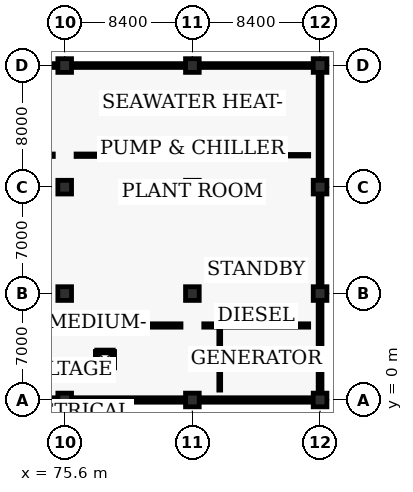
"""IFC4 building model, lengths in metres.
Left out: names, types, materials, properties, quantities, classifications, styles, units other than length and angle.
Written with IfcOpenShell. Run it as: python <this file> out.ifc"""

import sys

from ifc_helpers import new_model, si_unit, direction, frame, frame_2d, origin, origin_2d, place, context, subcontext, project, spatial, rectangle, extrude, element, fill, save


model = new_model("IFC4")
c1 = context("Model", 3, precision=1e-05, world=origin(), true_north=direction((0.0, 1.0)))
c2 = subcontext(c1, "Body", "Model", "MODEL_VIEW")
j1 = project(units=[si_unit("LENGTHUNIT", "METRE"), si_unit("PLANEANGLEUNIT", "RADIAN")], contexts=[c1])
p1 = place(None, origin())
s1 = spatial("IfcSite", under=j1, at=p1, CompositionType="ELEMENT")
p2 = place(p1, origin())
s2 = spatial("IfcBuilding", under=s1, at=p2, CompositionType="ELEMENT")
p3 = place(p2, origin())
s3 = spatial("IfcBuildingStorey", under=s2, at=p3, CompositionType="ELEMENT", Elevation=0.0)
for number, where, z_axis, x_axis in (
    (1, (75.6, 0.0, -0.46), (0.0, 0.0, 1.0), (1.0, 0.0, 0.0)),
    (2, (75.6, 7.0, -0.46), (0.0, 0.0, 1.0), (1.0, 0.0, 0.0)),
    (3, (75.6, 14.0, -0.46), (0.0, 0.0, 1.0), (1.0, 0.0, 0.0)),
    (4, (75.6, 22.0, -0.46), (0.0, 0.0, 1.0), (1.0, 0.0, 0.0)),
    (5, (84.0, 0.0, -0.46), (0.0, 0.0, 1.0), (1.0, 0.0, 0.0)),
    (6, (84.0, 7.0, -0.46), (0.0, 0.0, 1.0), (1.0, 0.0, 0.0)),
    (7, (84.0, 14.0, -0.46), (0.0, 0.0, 1.0), (1.0, 0.0, 0.0)),
    (8, (84.0, 22.0, -0.46), (0.0, 0.0, 1.0), (1.0, 0.0, 0.0)),
    (9, (92.4, 0.0, -0.46), (0.0, 0.0, 1.0), (1.0, 0.0, 0.0)),
    (10, (92.4, 7.0, -0.46), (0.0, 0.0, 1.0), (1.0, 0.0, 0.0)),
    (11, (92.4, 14.0, -0.46), (0.0, 0.0, 1.0), (1.0, 0.0, 0.0)),
    (12, (92.4, 22.0, -0.46), (0.0, 0.0, 1.0), (1.0, 0.0, 0.0)),
):
    element("IfcColumn", number, at=place(p3, frame(where, z_axis=z_axis, x_axis=x_axis)), inside=s3, PredefinedType="COLUMN", context=c2, shape_type="SweptSolid", body=[
        extrude(rectangle(XDim=0.9, YDim=0.9, at=origin_2d()), origin(), (0.0, 0.0, 1.0), 5.9),
    ])
p4 = place(p3, frame((67.65, 0.0, 0.0), z_axis=(0.0, 0.0, 1.0), x_axis=(1.0, 0.0, 0.0)))
e13 = element("IfcWall", 13, at=p4, inside=s3, PredefinedType="SOLIDWALL", context=c2, shape_type="SweptSolid", body=[
    extrude(rectangle(XDim=7.5, YDim=0.29, at=frame_2d((3.75, 0.0))), origin(), (0.0, 0.0, 1.0), 4.625),
])
p5 = place(p4, frame((1.64, 0.0, 0.0)))
e14 = element("IfcOpeningElement", 14, at=p5, cuts=e13, PredefinedType="OPENING", context=c2, shape_type="SweptSolid", body=[
    extrude(rectangle(XDim=1.85, YDim=2.2, at=frame_2d((0.925, 1.1))), frame((0.0, 0.155, 0.0), z_axis=(0.0, -1.0, 0.0), x_axis=(1.0, 0.0, 0.0)), (0.0, 0.0, 1.0), 0.31),
])
p6 = place(p4, frame((4.39, 0.0, 1.05)))
e15 = element("IfcOpeningElement", 15, at=p6, cuts=e13, PredefinedType="OPENING", context=c2, shape_type="SweptSolid", body=[
    extrude(rectangle(XDim=1.8, YDim=1.5, at=frame_2d((0.9, 0.75))), frame((0.0, 0.155, 0.0), z_axis=(0.0, -1.0, 0.0), x_axis=(1.0, 0.0, 0.0)), (0.0, 0.0, 1.0), 0.31),
])
p7 = place(p3, frame((75.15, 22.0, 0.0), z_axis=(0.0, 0.0, 1.0), x_axis=(-1.0, 0.0, 0.0)))
e16 = element("IfcWall", 16, at=p7, inside=s3, PredefinedType="SOLIDWALL", context=c2, shape_type="SweptSolid", body=[
    extrude(rectangle(XDim=7.5, YDim=0.25, at=frame_2d((3.75, 0.0))), origin(), (0.0, 0.0, 1.0), 4.625),
])
p8 = place(p7, frame((2.59, 0.0, 1.0)))
e17 = element("IfcOpeningElement", 17, at=p8, cuts=e16, PredefinedType="OPENING", context=c2, shape_type="SweptSolid", body=[
    extrude(rectangle(XDim=2.4, YDim=1.5, at=frame_2d((1.2, 0.75))), frame((0.0, 0.135, 0.0), z_axis=(0.0, -1.0, 0.0), x_axis=(1.0, 0.0, 0.0)), (0.0, 0.0, 1.0), 0.27),
])
p9 = place(p3, frame((76.05, 0.0, 0.0), z_axis=(0.0, 0.0, 1.0), x_axis=(1.0, 0.0, 0.0)))
e18 = element("IfcWall", 18, at=p9, inside=s3, PredefinedType="SOLIDWALL", context=c2, shape_type="SweptSolid", body=[
    extrude(rectangle(XDim=7.5, YDim=0.29, at=frame_2d((3.75, 0.0))), origin(), (0.0, 0.0, 1.0), 4.625),
])
p10 = place(p9, frame((2.89, 0.0, 1.05)))
e19 = element("IfcOpeningElement", 19, at=p10, cuts=e18, PredefinedType="OPENING", context=c2, shape_type="SweptSolid", body=[
    extrude(rectangle(XDim=2.0, YDim=1.45, at=frame_2d((1.0, 0.725))), frame((0.0, 0.155, 0.0), z_axis=(0.0, -1.0, 0.0), x_axis=(1.0, 0.0, 0.0)), (0.0, 0.0, 1.0), 0.31),
])
p11 = place(p3, frame((83.55, 22.0, 0.0), z_axis=(0.0, 0.0, 1.0), x_axis=(-1.0, 0.0, 0.0)))
e20 = element("IfcWall", 20, at=p11, inside=s3, PredefinedType="SOLIDWALL", context=c2, shape_type="SweptSolid", body=[
    extrude(rectangle(XDim=7.5, YDim=0.25, at=frame_2d((3.75, 0.0))), origin(), (0.0, 0.0, 1.0), 4.625),
])
p12 = place(p11, frame((2.59, 0.0, 1.0)))
e21 = element("IfcOpeningElement", 21, at=p12, cuts=e20, PredefinedType="OPENING", context=c2, shape_type="SweptSolid", body=[
    extrude(rectangle(XDim=2.4, YDim=1.5, at=frame_2d((1.2, 0.75))), frame((0.0, 0.135, 0.0), z_axis=(0.0, -1.0, 0.0), x_axis=(1.0, 0.0, 0.0)), (0.0, 0.0, 1.0), 0.27),
])
p13 = place(p3, frame((84.45, 0.0, 0.0), z_axis=(0.0, 0.0, 1.0), x_axis=(1.0, 0.0, 0.0)))
e22 = element("IfcWall", 22, at=p13, inside=s3, PredefinedType="SOLIDWALL", context=c2, shape_type="SweptSolid", body=[
    extrude(rectangle(XDim=7.5, YDim=0.29, at=frame_2d((3.75, 0.0))), origin(), (0.0, 0.0, 1.0), 4.625),
])
p14 = place(p13, frame((2.89, 0.0, 1.05)))
e23 = element("IfcOpeningElement", 23, at=p14, cuts=e22, PredefinedType="OPENING", context=c2, shape_type="SweptSolid", body=[
    extrude(rectangle(XDim=1.8, YDim=1.5, at=frame_2d((0.9, 0.75))), frame((0.0, 0.155, 0.0), z_axis=(0.0, -1.0, 0.0), x_axis=(1.0, 0.0, 0.0)), (0.0, 0.0, 1.0), 0.31),
])
p15 = place(p3, frame((91.95, 22.0, 0.0), z_axis=(0.0, 0.0, 1.0), x_axis=(-1.0, 0.0, 0.0)))
e24 = element("IfcWall", 24, at=p15, inside=s3, PredefinedType="SOLIDWALL", context=c2, shape_type="SweptSolid", body=[
    extrude(rectangle(XDim=7.5, YDim=0.25, at=frame_2d((3.75, 0.0))), origin(), (0.0, 0.0, 1.0), 4.625),
])
p16 = place(p15, frame((2.59, 0.0, 1.0)))
e25 = element("IfcOpeningElement", 25, at=p16, cuts=e24, PredefinedType="OPENING", context=c2, shape_type="SweptSolid", body=[
    extrude(rectangle(XDim=2.4, YDim=1.5, at=frame_2d((1.2, 0.75))), frame((0.0, 0.135, 0.0), z_axis=(0.0, -1.0, 0.0), x_axis=(1.0, 0.0, 0.0)), (0.0, 0.0, 1.0), 0.27),
])
p17 = place(p3, frame((92.4, 0.45, 0.0), z_axis=(0.0, 0.0, 1.0), x_axis=(0.0, 1.0, 0.0)))
e26 = element("IfcWall", 26, at=p17, inside=s3, PredefinedType="SOLIDWALL", context=c2, shape_type="SweptSolid", body=[
    extrude(rectangle(XDim=6.1, YDim=0.25, at=frame_2d((3.05, 0.0))), origin(), (0.0, 0.0, 1.0), 4.625),
])
p18 = place(p17, frame((1.34, 0.0, 0.95)))
e27 = element("IfcOpeningElement", 27, at=p18, cuts=e26, PredefinedType="OPENING", context=c2, shape_type="SweptSolid", body=[
    extrude(rectangle(XDim=1.8, YDim=1.5, at=frame_2d((0.9, 0.75))), frame((0.0, 0.135, 0.0), z_axis=(0.0, -1.0, 0.0), x_axis=(1.0, 0.0, 0.0)), (0.0, 0.0, 1.0), 0.27),
])
p19 = place(p17, frame((3.94, 0.0, 0.95)))
e28 = element("IfcOpeningElement", 28, at=p19, cuts=e26, PredefinedType="OPENING", context=c2, shape_type="SweptSolid", body=[
    extrude(rectangle(XDim=1.5, YDim=1.5, at=frame_2d((0.75, 0.75))), frame((0.0, 0.135, 0.0), z_axis=(0.0, -1.0, 0.0), x_axis=(1.0, 0.0, 0.0)), (0.0, 0.0, 1.0), 0.27),
])
p20 = place(p3, frame((92.4, 7.45, 0.0), z_axis=(0.0, 0.0, 1.0), x_axis=(0.0, 1.0, 0.0)))
e29 = element("IfcWall", 29, at=p20, inside=s3, PredefinedType="SOLIDWALL", context=c2, shape_type="SweptSolid", body=[
    extrude(rectangle(XDim=6.1, YDim=0.25, at=frame_2d((3.05, 0.0))), origin(), (0.0, 0.0, 1.0), 4.625),
])
p21 = place(p20, frame((1.34, 0.0, 0.95)))
e30 = element("IfcOpeningElement", 30, at=p21, cuts=e29, PredefinedType="OPENING", context=c2, shape_type="SweptSolid", body=[
    extrude(rectangle(XDim=1.8, YDim=1.5, at=frame_2d((0.9, 0.75))), frame((0.0, 0.135, 0.0), z_axis=(0.0, -1.0, 0.0), x_axis=(1.0, 0.0, 0.0)), (0.0, 0.0, 1.0), 0.27),
])
p22 = place(p20, frame((3.94, 0.0, 0.95)))
e31 = element("IfcOpeningElement", 31, at=p22, cuts=e29, PredefinedType="OPENING", context=c2, shape_type="SweptSolid", body=[
    extrude(rectangle(XDim=1.5, YDim=1.5, at=frame_2d((0.75, 0.75))), frame((0.0, 0.135, 0.0), z_axis=(0.0, -1.0, 0.0), x_axis=(1.0, 0.0, 0.0)), (0.0, 0.0, 1.0), 0.27),
])
p23 = place(p3, frame((92.4, 14.45, 0.0), z_axis=(0.0, 0.0, 1.0), x_axis=(0.0, 1.0, 0.0)))
e32 = element("IfcWall", 32, at=p23, inside=s3, PredefinedType="SOLIDWALL", context=c2, shape_type="SweptSolid", body=[
    extrude(rectangle(XDim=7.1, YDim=0.25, at=frame_2d((3.55, 0.0))), origin(), (0.0, 0.0, 1.0), 4.625),
])
p24 = place(p23, frame((1.34, 0.0, 0.95)))
e33 = element("IfcOpeningElement", 33, at=p24, cuts=e32, PredefinedType="OPENING", context=c2, shape_type="SweptSolid", body=[
    extrude(rectangle(XDim=1.8, YDim=1.5, at=frame_2d((0.9, 0.75))), frame((0.0, 0.135, 0.0), z_axis=(0.0, -1.0, 0.0), x_axis=(1.0, 0.0, 0.0)), (0.0, 0.0, 1.0), 0.27),
])
p25 = place(p23, frame((3.94, 0.0, 0.95)))
e34 = element("IfcOpeningElement", 34, at=p25, cuts=e32, PredefinedType="OPENING", context=c2, shape_type="SweptSolid", body=[
    extrude(rectangle(XDim=1.5, YDim=1.5, at=frame_2d((0.75, 0.75))), frame((0.0, 0.135, 0.0), z_axis=(0.0, -1.0, 0.0), x_axis=(1.0, 0.0, 0.0)), (0.0, 0.0, 1.0), 0.27),
])
p26 = place(p3, frame((77.71, 2.11, 0.0), z_axis=(0.0, 0.0, 1.0), x_axis=(1.0, 0.0, 0.0)))
e35 = element("IfcWall", 35, at=p26, inside=s3, PredefinedType="SOLIDWALL", context=c2, shape_type="SweptSolid", body=[
    extrude(rectangle(XDim=1.08, YDim=0.18, at=frame_2d((0.54, 0.0))), origin(), (0.0, 0.0, 1.0), 2.6),
])
p27 = place(p3, frame((78.79, 2.11, 0.0), z_axis=(0.0, 0.0, 1.0), x_axis=(0.0, 1.0, 0.0)))
e36 = element("IfcWall", 36, at=p27, inside=s3, PredefinedType="SOLIDWALL", context=c2, shape_type="SweptSolid", body=[
    extrude(rectangle(XDim=1.08, YDim=0.18, at=frame_2d((0.54, 0.0))), origin(), (0.0, 0.0, 1.0), 2.6),
])
p28 = place(p3, frame((78.79, 3.19, 0.0), z_axis=(0.0, 0.0, 1.0), x_axis=(-1.0, 0.0, 0.0)))
e37 = element("IfcWall", 37, at=p28, inside=s3, PredefinedType="SOLIDWALL", context=c2, shape_type="SweptSolid", body=[
    extrude(rectangle(XDim=1.08, YDim=0.18, at=frame_2d((0.54, 0.0))), origin(), (0.0, 0.0, 1.0), 2.6),
])
p29 = place(p3, frame((77.71, 3.19, 0.0), z_axis=(0.0, 0.0, 1.0), x_axis=(0.0, -1.0, 0.0)))
e38 = element("IfcWall", 38, at=p29, inside=s3, PredefinedType="SOLIDWALL", context=c2, shape_type="SweptSolid", body=[
    extrude(rectangle(XDim=1.08, YDim=0.18, at=frame_2d((0.54, 0.0))), origin(), (0.0, 0.0, 1.0), 2.6),
])
p30 = place(p3, frame((67.95, 4.9, 0.0), z_axis=(0.0, 0.0, 1.0), x_axis=(1.0, 0.0, 0.0)))
e39 = element("IfcWall", 39, at=p30, inside=s3, PredefinedType="SOLIDWALL", context=c2, shape_type="SweptSolid", body=[
    extrude(rectangle(XDim=6.9, YDim=0.22, at=frame_2d((3.45, 0.0))), origin(), (0.0, 0.0, 1.0), 2.55),
])
p31 = place(p30, frame((2.4, 0.0, 0.0)))
e40 = element("IfcOpeningElement", 40, at=p31, cuts=e39, PredefinedType="OPENING", context=c2, shape_type="SweptSolid", body=[
    extrude(rectangle(XDim=1.64, YDim=2.16, at=frame_2d((0.82, 1.08))), frame((0.0, 0.12, 0.0), z_axis=(0.0, -1.0, 0.0), x_axis=(1.0, 0.0, 0.0)), (0.0, 0.0, 1.0), 0.24),
])
p32 = place(p3, frame((67.95, 16.1, 0.0), z_axis=(0.0, 0.0, 1.0), x_axis=(1.0, 0.0, 0.0)))
e41 = element("IfcWall", 41, at=p32, inside=s3, PredefinedType="PARTITIONING", context=c2, shape_type="SweptSolid", body=[
    extrude(rectangle(XDim=6.9, YDim=0.16, at=frame_2d((3.45, 0.0))), origin(), (0.0, 0.0, 1.0), 2.5),
])
p33 = place(p32, frame((2.4, 0.0, 0.0)))
e42 = element("IfcOpeningElement", 42, at=p33, cuts=e41, PredefinedType="OPENING", context=c2, shape_type="SweptSolid", body=[
    extrude(rectangle(XDim=1.04, YDim=2.14, at=frame_2d((0.52, 1.07))), frame((0.0, 0.09, 0.0), z_axis=(0.0, -1.0, 0.0), x_axis=(1.0, 0.0, 0.0)), (0.0, 0.0, 1.0), 0.18),
])
p34 = place(p3, frame((76.35, 4.9, 0.0), z_axis=(0.0, 0.0, 1.0), x_axis=(1.0, 0.0, 0.0)))
e43 = element("IfcWall", 43, at=p34, inside=s3, PredefinedType="SOLIDWALL", context=c2, shape_type="SweptSolid", body=[
    extrude(rectangle(XDim=6.9, YDim=0.22, at=frame_2d((3.45, 0.0))), origin(), (0.0, 0.0, 1.0), 2.55),
])
p35 = place(p34, frame((2.4, 0.0, 0.0)))
e44 = element("IfcOpeningElement", 44, at=p35, cuts=e43, PredefinedType="OPENING", context=c2, shape_type="SweptSolid", body=[
    extrude(rectangle(XDim=1.64, YDim=2.16, at=frame_2d((0.82, 1.08))), frame((0.0, 0.12, 0.0), z_axis=(0.0, -1.0, 0.0), x_axis=(1.0, 0.0, 0.0)), (0.0, 0.0, 1.0), 0.24),
])
p36 = place(p3, frame((76.35, 16.1, 0.0), z_axis=(0.0, 0.0, 1.0), x_axis=(1.0, 0.0, 0.0)))
e45 = element("IfcWall", 45, at=p36, inside=s3, PredefinedType="PARTITIONING", context=c2, shape_type="SweptSolid", body=[
    extrude(rectangle(XDim=6.9, YDim=0.16, at=frame_2d((3.45, 0.0))), origin(), (0.0, 0.0, 1.0), 2.5),
])
p37 = place(p36, frame((2.4, 0.0, 0.0)))
e46 = element("IfcOpeningElement", 46, at=p37, cuts=e45, PredefinedType="OPENING", context=c2, shape_type="SweptSolid", body=[
    extrude(rectangle(XDim=1.04, YDim=2.14, at=frame_2d((0.52, 1.07))), frame((0.0, 0.09, 0.0), z_axis=(0.0, -1.0, 0.0), x_axis=(1.0, 0.0, 0.0)), (0.0, 0.0, 1.0), 0.18),
])
p38 = place(p3, frame((84.75, 4.9, 0.0), z_axis=(0.0, 0.0, 1.0), x_axis=(1.0, 0.0, 0.0)))
e47 = element("IfcWall", 47, at=p38, inside=s3, PredefinedType="SOLIDWALL", context=c2, shape_type="SweptSolid", body=[
    extrude(rectangle(XDim=6.9, YDim=0.22, at=frame_2d((3.45, 0.0))), origin(), (0.0, 0.0, 1.0), 2.55),
])
p39 = place(p38, frame((2.4, 0.0, 0.0)))
e48 = element("IfcOpeningElement", 48, at=p39, cuts=e47, PredefinedType="OPENING", context=c2, shape_type="SweptSolid", body=[
    extrude(rectangle(XDim=1.64, YDim=2.16, at=frame_2d((0.82, 1.08))), frame((0.0, 0.12, 0.0), z_axis=(0.0, -1.0, 0.0), x_axis=(1.0, 0.0, 0.0)), (0.0, 0.0, 1.0), 0.24),
])
p40 = place(p3, frame((85.8, 0.65, 0.0), z_axis=(0.0, 0.0, 1.0), x_axis=(0.0, 1.0, 0.0)))
e49 = element("IfcWall", 49, at=p40, inside=s3, PredefinedType="PARTITIONING", context=c2, shape_type="SweptSolid", body=[
    extrude(rectangle(XDim=4.1, YDim=0.12, at=frame_2d((2.05, 0.0))), origin(), (0.0, 0.0, 1.0), 2.5),
])
p41 = place(p40, frame((1.4, 0.0, 0.0)))
e50 = element("IfcOpeningElement", 50, at=p41, cuts=e49, PredefinedType="OPENING", context=c2, shape_type="SweptSolid", body=[
    extrude(rectangle(XDim=0.94, YDim=2.08, at=frame_2d((0.47, 1.04))), frame((0.0, 0.07, 0.0), z_axis=(0.0, -1.0, 0.0), x_axis=(1.0, 0.0, 0.0)), (0.0, 0.0, 1.0), 0.14),
])
p42 = place(p3, frame((84.75, 16.1, 0.0), z_axis=(0.0, 0.0, 1.0), x_axis=(1.0, 0.0, 0.0)))
e51 = element("IfcWall", 51, at=p42, inside=s3, PredefinedType="PARTITIONING", context=c2, shape_type="SweptSolid", body=[
    extrude(rectangle(XDim=6.9, YDim=0.1, at=frame_2d((3.45, 0.0))), origin(), (0.0, 0.0, 1.0), 2.5),
])
p43 = place(p42, frame((2.4, 0.0, 0.0)))
e52 = element("IfcOpeningElement", 52, at=p43, cuts=e51, PredefinedType="OPENING", context=c2, shape_type="SweptSolid", body=[
    extrude(rectangle(XDim=1.06, YDim=2.1, at=frame_2d((0.53, 1.05))), frame((0.0, 0.06, 0.0), z_axis=(0.0, -1.0, 0.0), x_axis=(1.0, 0.0, 0.0)), (0.0, 0.0, 1.0), 0.12),
])
p44 = place(p10, origin())
e53 = element("IfcWindow", 53, at=p44, inside=s3, PartitioningType="DOUBLE_PANEL_VERTICAL", PredefinedType="WINDOW", context=c2, shape_type="SweptSolid", body=[
    extrude(rectangle(XDim=2.0, YDim=1.45, at=frame_2d((1.0, 0.725))), frame((0.0, 0.03, 0.0), z_axis=(0.0, -1.0, 0.0), x_axis=(1.0, 0.0, 0.0)), (0.0, 0.0, 1.0), 0.06),
])
fill(e19, e53)
p45 = place(p12, origin())
e54 = element("IfcWindow", 54, at=p45, inside=s3, PartitioningType="TRIPLE_PANEL_VERTICAL", PredefinedType="WINDOW", context=c2, shape_type="SweptSolid", body=[
    extrude(rectangle(XDim=2.4, YDim=1.5, at=frame_2d((1.2, 0.75))), frame((0.0, 0.03, 0.0), z_axis=(0.0, -1.0, 0.0), x_axis=(1.0, 0.0, 0.0)), (0.0, 0.0, 1.0), 0.06),
])
fill(e21, e54)
p46 = place(p14, origin())
e55 = element("IfcWindow", 55, at=p46, inside=s3, PartitioningType="DOUBLE_PANEL_VERTICAL", PredefinedType="WINDOW", context=c2, shape_type="SweptSolid", body=[
    extrude(rectangle(XDim=1.8, YDim=1.5, at=frame_2d((0.9, 0.75))), frame((0.0, 0.03, 0.0), z_axis=(0.0, -1.0, 0.0), x_axis=(1.0, 0.0, 0.0)), (0.0, 0.0, 1.0), 0.06),
])
fill(e23, e55)
p47 = place(p16, origin())
e56 = element("IfcWindow", 56, at=p47, inside=s3, PartitioningType="TRIPLE_PANEL_VERTICAL", PredefinedType="WINDOW", context=c2, shape_type="SweptSolid", body=[
    extrude(rectangle(XDim=2.4, YDim=1.5, at=frame_2d((1.2, 0.75))), frame((0.0, 0.03, 0.0), z_axis=(0.0, -1.0, 0.0), x_axis=(1.0, 0.0, 0.0)), (0.0, 0.0, 1.0), 0.06),
])
fill(e25, e56)
p48 = place(p18, origin())
e57 = element("IfcWindow", 57, at=p48, inside=s3, PartitioningType="DOUBLE_PANEL_VERTICAL", PredefinedType="WINDOW", context=c2, shape_type="SweptSolid", body=[
    extrude(rectangle(XDim=1.8, YDim=1.5, at=frame_2d((0.9, 0.75))), frame((0.0, 0.03, 0.0), z_axis=(0.0, -1.0, 0.0), x_axis=(1.0, 0.0, 0.0)), (0.0, 0.0, 1.0), 0.06),
])
fill(e27, e57)
p49 = place(p19, origin())
e58 = element("IfcWindow", 58, at=p49, inside=s3, PartitioningType="SINGLE_PANEL", PredefinedType="WINDOW", context=c2, shape_type="SweptSolid", body=[
    extrude(rectangle(XDim=1.5, YDim=1.5, at=frame_2d((0.75, 0.75))), frame((0.0, 0.03, 0.0), z_axis=(0.0, -1.0, 0.0), x_axis=(1.0, 0.0, 0.0)), (0.0, 0.0, 1.0), 0.06),
])
fill(e28, e58)
p50 = place(p21, origin())
e59 = element("IfcWindow", 59, at=p50, inside=s3, PartitioningType="DOUBLE_PANEL_VERTICAL", PredefinedType="WINDOW", context=c2, shape_type="SweptSolid", body=[
    extrude(rectangle(XDim=1.8, YDim=1.5, at=frame_2d((0.9, 0.75))), frame((0.0, 0.03, 0.0), z_axis=(0.0, -1.0, 0.0), x_axis=(1.0, 0.0, 0.0)), (0.0, 0.0, 1.0), 0.06),
])
fill(e30, e59)
p51 = place(p22, origin())
e60 = element("IfcWindow", 60, at=p51, inside=s3, PartitioningType="SINGLE_PANEL", PredefinedType="WINDOW", context=c2, shape_type="SweptSolid", body=[
    extrude(rectangle(XDim=1.5, YDim=1.5, at=frame_2d((0.75, 0.75))), frame((0.0, 0.03, 0.0), z_axis=(0.0, -1.0, 0.0), x_axis=(1.0, 0.0, 0.0)), (0.0, 0.0, 1.0), 0.06),
])
fill(e31, e60)
p52 = place(p24, origin())
e61 = element("IfcWindow", 61, at=p52, inside=s3, PartitioningType="DOUBLE_PANEL_VERTICAL", PredefinedType="WINDOW", context=c2, shape_type="SweptSolid", body=[
    extrude(rectangle(XDim=1.8, YDim=1.5, at=frame_2d((0.9, 0.75))), frame((0.0, 0.03, 0.0), z_axis=(0.0, -1.0, 0.0), x_axis=(1.0, 0.0, 0.0)), (0.0, 0.0, 1.0), 0.06),
])
fill(e33, e61)
p53 = place(p25, origin())
e62 = element("IfcWindow", 62, at=p53, inside=s3, PartitioningType="SINGLE_PANEL", PredefinedType="WINDOW", context=c2, shape_type="SweptSolid", body=[
    extrude(rectangle(XDim=1.5, YDim=1.5, at=frame_2d((0.75, 0.75))), frame((0.0, 0.03, 0.0), z_axis=(0.0, -1.0, 0.0), x_axis=(1.0, 0.0, 0.0)), (0.0, 0.0, 1.0), 0.06),
])
fill(e34, e62)
p54 = place(p35, origin())
e63 = element("IfcDoor", 63, at=p54, inside=s3, OperationType="DOUBLE_DOOR_SINGLE_SWING", PredefinedType="DOOR", context=c2, shape_type="SweptSolid", body=[
    extrude(rectangle(XDim=1.64, YDim=2.16, at=frame_2d((0.82, 1.08))), frame((0.0, 0.025, 0.0), z_axis=(0.0, -1.0, 0.0), x_axis=(1.0, 0.0, 0.0)), (0.0, 0.0, 1.0), 0.05),
])
fill(e44, e63)
p55 = place(p37, origin())
e64 = element("IfcDoor", 64, at=p55, inside=s3, OperationType="SINGLE_SWING_LEFT", PredefinedType="DOOR", context=c2, shape_type="SweptSolid", body=[
    extrude(rectangle(XDim=1.04, YDim=2.14, at=frame_2d((0.52, 1.07))), frame((0.0, 0.025, 0.0), z_axis=(0.0, -1.0, 0.0), x_axis=(1.0, 0.0, 0.0)), (0.0, 0.0, 1.0), 0.05),
])
fill(e46, e64)
p56 = place(p39, origin())
e65 = element("IfcDoor", 65, at=p56, inside=s3, OperationType="DOUBLE_DOOR_SINGLE_SWING", PredefinedType="DOOR", context=c2, shape_type="SweptSolid", body=[
    extrude(rectangle(XDim=1.64, YDim=2.16, at=frame_2d((0.82, 1.08))), frame((0.0, 0.025, 0.0), z_axis=(0.0, -1.0, 0.0), x_axis=(1.0, 0.0, 0.0)), (0.0, 0.0, 1.0), 0.05),
])
fill(e48, e65)
p57 = place(p41, origin())
e66 = element("IfcDoor", 66, at=p57, inside=s3, OperationType="SINGLE_SWING_RIGHT", PredefinedType="DOOR", context=c2, shape_type="SweptSolid", body=[
    extrude(rectangle(XDim=0.94, YDim=2.08, at=frame_2d((0.47, 1.04))), frame((0.0, 0.025, 0.0), z_axis=(0.0, -1.0, 0.0), x_axis=(1.0, 0.0, 0.0)), (0.0, 0.0, 1.0), 0.05),
])
fill(e50, e66)
p58 = place(p43, origin())
e67 = element("IfcDoor", 67, at=p58, inside=s3, OperationType="SINGLE_SWING_LEFT", PredefinedType="DOOR", context=c2, shape_type="SweptSolid", body=[
    extrude(rectangle(XDim=1.06, YDim=2.1, at=frame_2d((0.53, 1.05))), frame((0.0, 0.025, 0.0), z_axis=(0.0, -1.0, 0.0), x_axis=(1.0, 0.0, 0.0)), (0.0, 0.0, 1.0), 0.05),
])
fill(e52, e67)
save(model, sys.argv[1])
